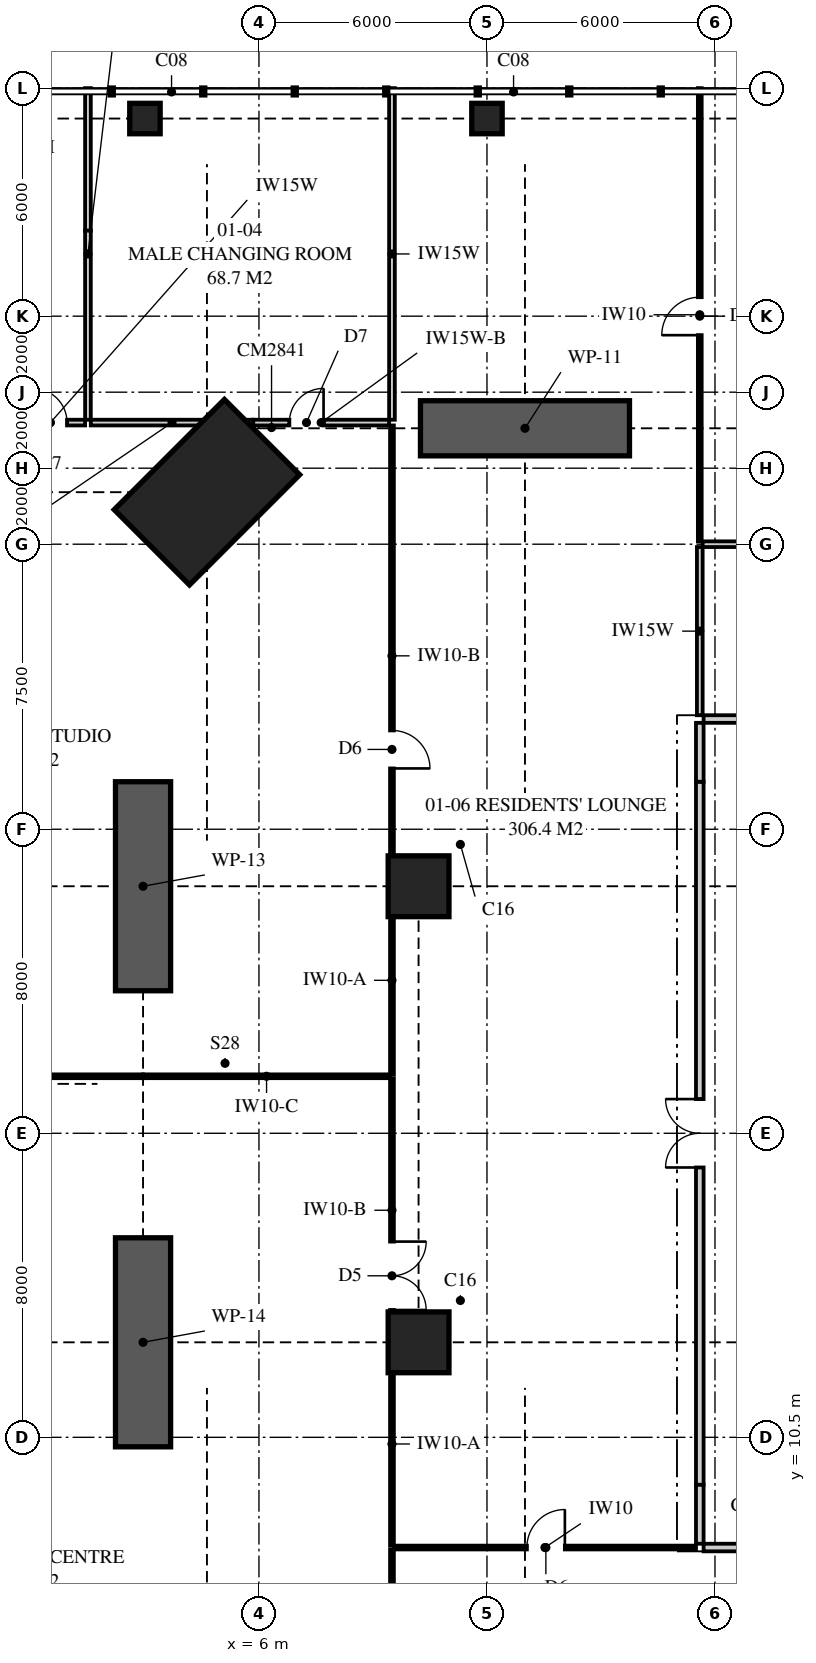
"""IFC4 building model, lengths in metres.
Left out: names, types, materials, properties, quantities, classifications, styles, units other than length and angle.
Written with IfcOpenShell. Run it as: python <this file> out.ifc"""

import sys

from ifc_helpers import new_model, si_unit, direction, frame, frame_2d, origin, origin_2d, place, context, subcontext, project, spatial, polyline, rectangle, outline, extrude, element, fill, save


model = new_model("IFC4")
c1 = context("Model", 3, precision=1e-05, world=origin(), true_north=direction((0.0, 1.0)))
c2 = subcontext(c1, "Body", "Model", "MODEL_VIEW")
j1 = project(units=[si_unit("LENGTHUNIT", "METRE"), si_unit("PLANEANGLEUNIT", "RADIAN")], contexts=[c1])
p1 = place(None, origin())
s1 = spatial("IfcSite", under=j1, at=p1, CompositionType="ELEMENT")
p2 = place(p1, origin())
s2 = spatial("IfcBuilding", under=s1, at=p2, CompositionType="ELEMENT")
p3 = place(p2, frame((0.0, 0.0, 6.0)))
s3 = spatial("IfcBuildingStorey", under=s2, at=p3, CompositionType="ELEMENT", Elevation=6.0)
p4 = place(p3, frame((4.631, 35.369, 0.0), z_axis=(0.0, 0.0, 1.0), x_axis=(0.707106781187, -0.707106781187, 0.0)))
e1 = element("IfcColumn", 1, at=p4, inside=s3, PredefinedType="COLUMN", context=c2, shape_type="SweptSolid", body=[
    extrude(rectangle(XDim=2.8, YDim=4.1, at=origin_2d()), origin(), (0.0, 0.0, 1.0), 5.0),
])
for number, where, z_axis, x_axis in (
    (2, (10.2, 13.0, 0.0), (0.0, 0.0, 1.0), (1.0, 0.0, 0.0)),
    (3, (10.2, 25.0, 0.0), (0.0, 0.0, 1.0), (1.0, 0.0, 0.0)),
):
    element("IfcColumn", number, at=place(p3, frame(where, z_axis=z_axis, x_axis=x_axis)), inside=s3, PredefinedType="COLUMN", context=c2, shape_type="SweptSolid", body=[
        extrude(rectangle(XDim=1.6, YDim=1.6, at=origin_2d()), origin(), (0.0, 0.0, 1.0), 5.0),
    ])
for number, where, z_axis, x_axis in (
    (4, (3.0, 45.2, 0.0), (0.0, 0.0, 1.0), (1.0, 0.0, 0.0)),
    (5, (12.0, 45.2, 0.0), (0.0, 0.0, 1.0), (1.0, 0.0, 0.0)),
):
    element("IfcColumn", number, at=place(p3, frame(where, z_axis=z_axis, x_axis=x_axis)), inside=s3, PredefinedType="COLUMN", context=c2, shape_type="SweptSolid", body=[
        extrude(rectangle(XDim=0.8, YDim=0.8, at=origin_2d()), origin(), (0.0, 0.0, 1.0), 5.0),
    ])
p5 = place(p3, frame((-9.2, 20.0, 0.0), z_axis=(0.0, 0.0, 1.0), x_axis=(1.0, 0.0, 0.0)))
e6 = element("IfcWall", 6, at=p5, inside=s3, PredefinedType="PARTITIONING", context=c2, shape_type="SweptSolid", body=[
    extrude(rectangle(XDim=12.15, YDim=0.1, at=frame_2d((6.075, 0.0))), origin(), (0.0, 0.0, 1.0), 4.12),
])
p6 = place(p3, frame((2.95, 20.0, 0.0), z_axis=(0.0, 0.0, 1.0), x_axis=(1.0, 0.0, 0.0)))
e7 = element("IfcWall", 7, at=p6, inside=s3, PredefinedType="PARTITIONING", context=c2, shape_type="SweptSolid", body=[
    extrude(outline(polyline([(0.0, 0.0), (6.5, 0.0), (6.5, 4.12), (5.99, 4.12), (5.99, 4.72), (1.26, 4.72), (1.26, 4.12), (0.0, 4.12), (0.0, 0.0)])), frame((0.0, 0.05, 0.0), z_axis=(0.0, -1.0, 0.0), x_axis=(1.0, 0.0, 0.0)), (0.0, 0.0, 1.0), 0.1),
])
p7 = place(p3, frame((9.5, 7.65, 0.0), z_axis=(0.0, 0.0, 1.0), x_axis=(0.0, 1.0, 0.0)))
e8 = element("IfcWall", 8, at=p7, inside=s3, PredefinedType="PARTITIONING", context=c2, shape_type="SweptSolid", body=[
    extrude(outline(polyline([(0.0, 0.0), (5.35, 0.0), (5.35, 4.12), (4.09, 4.12), (4.09, 4.72), (0.0, 4.72), (0.0, 0.0)])), frame((0.0, 0.05, 0.0), z_axis=(0.0, -1.0, 0.0), x_axis=(1.0, 0.0, 0.0)), (0.0, 0.0, 1.0), 0.1),
])
p8 = place(p3, frame((9.5, 13.0, 0.0), z_axis=(0.0, 0.0, 1.0), x_axis=(0.0, 1.0, 0.0)))
e9 = element("IfcWall", 9, at=p8, inside=s3, PredefinedType="PARTITIONING", context=c2, shape_type="SweptSolid", body=[
    extrude(rectangle(XDim=6.95, YDim=0.1, at=frame_2d((3.475, 0.0))), origin(), (0.0, 0.0, 1.0), 4.12),
])
p9 = place(p8, frame((0.85, 0.0, 0.0)))
e10 = element("IfcOpeningElement", 10, at=p9, cuts=e9, PredefinedType="OPENING", context=c2, shape_type="SweptSolid", body=[
    extrude(rectangle(XDim=1.8, YDim=2.1, at=frame_2d((0.9, 1.05))), frame((0.0, 0.06, 0.0), z_axis=(0.0, -1.0, 0.0), x_axis=(1.0, 0.0, 0.0)), (0.0, 0.0, 1.0), 0.12),
])
p10 = place(p3, frame((9.5, -6.0, 0.0), z_axis=(0.0, 0.0, 1.0), x_axis=(0.0, 1.0, 0.0)))
e11 = element("IfcWall", 11, at=p10, inside=s3, PredefinedType="PARTITIONING", context=c2, shape_type="SweptSolid", body=[
    extrude(outline(polyline([(0.0, 0.0), (13.55, 0.0), (13.55, 4.72), (8.21, 4.72), (8.21, 3.92), (5.69, 3.92), (5.69, 4.72), (2.06, 4.72), (2.06, 4.12), (0.0, 4.12), (0.0, 4.72), (0.0, 0.0)])), frame((0.0, 0.05, 0.0), z_axis=(0.0, -1.0, 0.0), x_axis=(1.0, 0.0, 0.0)), (0.0, 0.0, 1.0), 0.1),
])
p11 = place(p10, frame((5.4, 0.0, 0.0)))
e12 = element("IfcOpeningElement", 12, at=p11, cuts=e11, PredefinedType="OPENING", context=c2, shape_type="SweptSolid", body=[
    extrude(rectangle(XDim=1.0, YDim=2.1, at=frame_2d((0.5, 1.05))), frame((0.0, 0.06, 0.0), z_axis=(0.0, -1.0, 0.0), x_axis=(1.0, 0.0, 0.0)), (0.0, 0.0, 1.0), 0.12),
])
p12 = place(p3, frame((-0.4, 37.2, 0.0), z_axis=(0.0, 0.0, 1.0), x_axis=(1.0, 0.0, 0.0)))
e13 = element("IfcWall", 13, at=p12, inside=s3, PredefinedType="PLUMBINGWALL", context=c2, shape_type="SweptSolid", body=[
    extrude(rectangle(XDim=1.825, YDim=0.15, at=frame_2d((0.913, 0.0))), origin(), (0.0, 0.0, 1.0), 4.72),
])
p13 = place(p12, frame((0.45, 0.0, 0.0)))
e14 = element("IfcOpeningElement", 14, at=p13, cuts=e13, PredefinedType="OPENING", context=c2, shape_type="SweptSolid", body=[
    extrude(rectangle(XDim=0.9, YDim=2.1, at=frame_2d((0.45, 1.05))), frame((0.0, 0.085, 0.0), z_axis=(0.0, -1.0, 0.0), x_axis=(1.0, 0.0, 0.0)), (0.0, 0.0, 1.0), 0.17),
])
p14 = place(p3, frame((1.575, 37.2, 0.0), z_axis=(0.0, 0.0, 1.0), x_axis=(1.0, 0.0, 0.0)))
e15 = element("IfcWall", 15, at=p14, inside=s3, PredefinedType="PLUMBINGWALL", context=c2, shape_type="SweptSolid", body=[
    extrude(outline(polyline([(0.0, 0.0), (4.274, 0.0), (4.274, 4.12), (1.771, 4.12), (1.771, 4.72), (0.0, 4.72), (0.0, 0.0)])), frame((0.0, 0.075, 0.0), z_axis=(0.0, -1.0, 0.0), x_axis=(1.0, 0.0, 0.0)), (0.0, 0.0, 1.0), 0.15),
])
p15 = place(p3, frame((5.849, 37.2, 0.0), z_axis=(0.0, 0.0, 1.0), x_axis=(1.0, 0.0, 0.0)))
e16 = element("IfcWall", 16, at=p15, inside=s3, PredefinedType="PLUMBINGWALL", context=c2, shape_type="SweptSolid", body=[
    extrude(rectangle(XDim=3.576, YDim=0.15, at=frame_2d((1.788, 0.0))), origin(), (0.0, 0.0, 1.0), 3.92),
])
p16 = place(p15, frame((0.951, 0.0, 0.0)))
e17 = element("IfcOpeningElement", 17, at=p16, cuts=e16, PredefinedType="OPENING", context=c2, shape_type="SweptSolid", body=[
    extrude(rectangle(XDim=0.9, YDim=2.1, at=frame_2d((0.45, 1.05))), frame((0.0, 0.085, 0.0), z_axis=(0.0, -1.0, 0.0), x_axis=(1.0, 0.0, 0.0)), (0.0, 0.0, 1.0), 0.17),
])
p17 = place(p3, frame((9.5, 20.05, 0.0), z_axis=(0.0, 0.0, 1.0), x_axis=(0.0, 1.0, 0.0)))
e18 = element("IfcWall", 18, at=p17, inside=s3, PredefinedType="PARTITIONING", context=c2, shape_type="SweptSolid", body=[
    extrude(rectangle(XDim=4.95, YDim=0.1, at=frame_2d((2.475, 0.0))), origin(), (0.0, 0.0, 1.0), 4.12),
])
p18 = place(p3, frame((9.5, 25.0, 0.0), z_axis=(0.0, 0.0, 1.0), x_axis=(0.0, 1.0, 0.0)))
e19 = element("IfcWall", 19, at=p18, inside=s3, PredefinedType="PARTITIONING", context=c2, shape_type="SweptSolid", body=[
    extrude(outline(polyline([(0.0, 0.0), (12.125, 0.0), (12.125, 3.92), (10.79, 3.92), (10.79, 4.72), (1.26, 4.72), (1.26, 4.12), (0.0, 4.12), (0.0, 0.0)])), frame((0.0, 0.05, 0.0), z_axis=(0.0, -1.0, 0.0), x_axis=(1.0, 0.0, 0.0)), (0.0, 0.0, 1.0), 0.1),
])
p19 = place(p18, frame((3.1, 0.0, 0.0)))
e20 = element("IfcOpeningElement", 20, at=p19, cuts=e19, PredefinedType="OPENING", context=c2, shape_type="SweptSolid", body=[
    extrude(rectangle(XDim=1.0, YDim=2.1, at=frame_2d((0.5, 1.05))), frame((0.0, 0.06, 0.0), z_axis=(0.0, -1.0, 0.0), x_axis=(1.0, 0.0, 0.0)), (0.0, 0.0, 1.0), 0.12),
])
p20 = place(p3, frame((1.5, 37.275, 0.0), z_axis=(0.0, 0.0, 1.0), x_axis=(0.0, 1.0, 0.0)))
e21 = element("IfcWall", 21, at=p20, inside=s3, PredefinedType="PLUMBINGWALL", context=c2, shape_type="SweptSolid", body=[
    extrude(rectangle(XDim=4.975, YDim=0.15, at=frame_2d((2.488, 0.0))), origin(), (0.0, 0.0, 1.0), 4.72),
])
p21 = place(p3, frame((1.5, 42.25, 0.0), z_axis=(0.0, 0.0, 1.0), x_axis=(0.0, 1.0, 0.0)))
e22 = element("IfcWall", 22, at=p21, inside=s3, PredefinedType="PLUMBINGWALL", context=c2, shape_type="SweptSolid", body=[
    extrude(outline(polyline([(0.0, 0.0), (3.75, 0.0), (3.75, 4.72), (3.75, 4.12), (1.665, 4.12), (1.665, 4.72), (0.0, 4.72), (0.0, 0.0)])), frame((0.0, 0.075, 0.0), z_axis=(0.0, -1.0, 0.0), x_axis=(1.0, 0.0, 0.0)), (0.0, 0.0, 1.0), 0.15),
])
p22 = place(p3, frame((9.5, 37.275, 0.0), z_axis=(0.0, 0.0, 1.0), x_axis=(0.0, 1.0, 0.0)))
e23 = element("IfcWall", 23, at=p22, inside=s3, PredefinedType="PLUMBINGWALL", context=c2, shape_type="SweptSolid", body=[
    extrude(outline(polyline([(0.0, 0.0), (8.725, 0.0), (8.725, 4.72), (8.725, 4.12), (6.64, 4.12), (6.64, 4.72), (1.06, 4.72), (1.06, 3.92), (0.0, 3.92), (0.0, 4.72), (0.0, 0.0)])), frame((0.0, 0.075, 0.0), z_axis=(0.0, -1.0, 0.0), x_axis=(1.0, 0.0, 0.0)), (0.0, 0.0, 1.0), 0.15),
])
p23 = place(p3, frame((9.55, 7.6, 0.0), z_axis=(0.0, 0.0, 1.0), x_axis=(1.0, 0.0, 0.0)))
e24 = element("IfcWall", 24, at=p23, inside=s3, PredefinedType="PARTITIONING", context=c2, shape_type="SweptSolid", body=[
    extrude(outline(polyline([(0.0, 0.0), (7.95, 0.0), (7.95, 4.72), (4.71, 4.72), (4.71, 4.12), (2.19, 4.12), (2.19, 4.72), (0.0, 4.72), (0.0, 0.0)])), frame((0.0, 0.05, 0.0), z_axis=(0.0, -1.0, 0.0), x_axis=(1.0, 0.0, 0.0)), (0.0, 0.0, 1.0), 0.1),
])
p24 = place(p23, frame((3.5, 0.0, 0.0)))
e25 = element("IfcOpeningElement", 25, at=p24, cuts=e24, PredefinedType="OPENING", context=c2, shape_type="SweptSolid", body=[
    extrude(rectangle(XDim=1.0, YDim=2.1, at=frame_2d((0.5, 1.05))), frame((0.0, 0.06, 0.0), z_axis=(0.0, -1.0, 0.0), x_axis=(1.0, 0.0, 0.0)), (0.0, 0.0, 1.0), 0.12),
])
for number, where, z_axis, x_axis in (
    (26, (17.6, 7.7, 0.0), (0.0, 0.0, 1.0), (0.0, 1.0, 0.0)),
    (27, (17.6, 27.75, 0.0), (0.0, 0.0, 1.0), (0.0, 1.0, 0.0)),
):
    element("IfcWall", number, at=place(p3, frame(where, z_axis=z_axis, x_axis=x_axis)), inside=s3, PredefinedType="PARTITIONING", context=c2, shape_type="SweptSolid", body=[
        extrude(rectangle(XDim=1.55, YDim=0.2, at=frame_2d((0.775, 0.0))), origin(), (0.0, 0.0, 1.0), 4.72),
    ])
p25 = place(p3, frame((17.6, 9.25, 0.0), z_axis=(0.0, 0.0, 1.0), x_axis=(0.0, 1.0, 0.0)))
e28 = element("IfcWall", 28, at=p25, inside=s3, PredefinedType="PARTITIONING", context=c2, shape_type="SweptSolid", body=[
    extrude(outline(polyline([(0.0, 0.0), (18.5, 0.0), (18.5, 4.72), (17.06, 4.72), (17.06, 4.12), (14.44, 4.12), (14.44, 4.72), (5.06, 4.72), (5.06, 4.12), (2.44, 4.12), (2.44, 4.72), (0.0, 4.72), (0.0, 0.0)])), frame((0.0, 0.1, 0.0), z_axis=(0.0, -1.0, 0.0), x_axis=(1.0, 0.0, 0.0)), (0.0, 0.0, 1.0), 0.2),
])
p26 = place(p25, frame((8.35, 0.0, 0.0)))
e29 = element("IfcOpeningElement", 29, at=p26, cuts=e28, PredefinedType="OPENING", context=c2, shape_type="SweptSolid", body=[
    extrude(rectangle(XDim=1.8, YDim=2.1, at=frame_2d((0.9, 1.05))), frame((0.0, 0.11, 0.0), z_axis=(0.0, -1.0, 0.0), x_axis=(1.0, 0.0, 0.0)), (0.0, 0.0, 1.0), 0.22),
])
p27 = place(p3, frame((17.6, 29.5, 0.0), z_axis=(0.0, 0.0, 1.0), x_axis=(0.0, 1.0, 0.0)))
e30 = element("IfcWall", 30, at=p27, inside=s3, PredefinedType="PLUMBINGWALL", context=c2, shape_type="SweptSolid", body=[
    extrude(rectangle(XDim=4.425, YDim=0.15, at=frame_2d((2.212, 0.0))), origin(), (0.0, 0.0, 1.0), 4.72),
])
p28 = place(p3, frame((17.6, 34.075, 0.0), z_axis=(0.0, 0.0, 1.0), x_axis=(0.0, 1.0, 0.0)))
e31 = element("IfcWall", 31, at=p28, inside=s3, PredefinedType="PARTITIONING", context=c2, shape_type="SweptSolid", body=[
    extrude(outline(polyline([(0.0, 0.0), (11.925, 0.0), (11.925, 4.72), (11.925, 4.12), (9.865, 4.12), (9.865, 4.72), (4.235, 4.72), (4.235, 4.12), (1.715, 4.12), (1.715, 4.72), (0.0, 4.72), (0.0, 0.0)])), frame((0.0, 0.05, 0.0), z_axis=(0.0, -1.0, 0.0), x_axis=(1.0, 0.0, 0.0)), (0.0, 0.0, 1.0), 0.1),
])
p29 = place(p28, frame((5.425, 0.0, 0.0)))
e32 = element("IfcOpeningElement", 32, at=p29, cuts=e31, PredefinedType="OPENING", context=c2, shape_type="SweptSolid", body=[
    extrude(rectangle(XDim=1.0, YDim=2.1, at=frame_2d((0.5, 1.05))), frame((0.0, 0.06, 0.0), z_axis=(0.0, -1.0, 0.0), x_axis=(1.0, 0.0, 0.0)), (0.0, 0.0, 1.0), 0.12),
])
p30 = place(p3, frame((17.7, 7.6, 0.0), z_axis=(0.0, 0.0, 1.0), x_axis=(1.0, 0.0, 0.0)))
e33 = element("IfcWall", 33, at=p30, inside=s3, PredefinedType="PARTITIONING", context=c2, shape_type="SweptSolid", body=[
    extrude(outline(polyline([(0.0, 0.0), (12.25, 0.0), (12.25, 4.72), (12.25, 4.12), (9.99, 4.12), (9.99, 4.72), (7.61, 4.72), (7.61, 4.12), (4.99, 4.12), (4.99, 4.72), (4.11, 4.72), (4.11, 4.12), (1.49, 4.12), (1.49, 4.72), (0.0, 4.72), (0.0, 0.0)])), frame((0.0, 0.1, 0.0), z_axis=(0.0, -1.0, 0.0), x_axis=(1.0, 0.0, 0.0)), (0.0, 0.0, 1.0), 0.2),
])
p31 = place(p30, frame((5.6, 0.0, 0.0)))
e34 = element("IfcOpeningElement", 34, at=p31, cuts=e33, PredefinedType="OPENING", context=c2, shape_type="SweptSolid", body=[
    extrude(rectangle(XDim=1.0, YDim=2.1, at=frame_2d((0.5, 1.05))), frame((0.0, 0.11, 0.0), z_axis=(0.0, -1.0, 0.0), x_axis=(1.0, 0.0, 0.0)), (0.0, 0.0, 1.0), 0.22),
])
p32 = place(p3, frame((17.7, 29.4, 0.0), z_axis=(0.0, 0.0, 1.0), x_axis=(1.0, 0.0, 0.0)))
e35 = element("IfcWall", 35, at=p32, inside=s3, PredefinedType="PARTITIONING", context=c2, shape_type="SweptSolid", body=[
    extrude(rectangle(XDim=3.041, YDim=0.2, at=frame_2d((1.521, 0.0))), origin(), (0.0, 0.0, 1.0), 4.72),
])
p33 = place(p32, frame((1.008, 0.0, 0.0)))
e36 = element("IfcOpeningElement", 36, at=p33, cuts=e35, PredefinedType="OPENING", context=c2, shape_type="SweptSolid", body=[
    extrude(rectangle(XDim=1.0, YDim=2.1, at=frame_2d((0.5, 1.05))), frame((0.0, 0.11, 0.0), z_axis=(0.0, -1.0, 0.0), x_axis=(1.0, 0.0, 0.0)), (0.0, 0.0, 1.0), 0.22),
])
p34 = place(p3, frame((17.675, 34.0, 0.0), z_axis=(0.0, 0.0, 1.0), x_axis=(1.0, 0.0, 0.0)))
e37 = element("IfcWall", 37, at=p34, inside=s3, PredefinedType="PLUMBINGWALL", context=c2, shape_type="SweptSolid", body=[
    extrude(rectangle(XDim=3.066, YDim=0.15, at=frame_2d((1.533, 0.0))), origin(), (0.0, 0.0, 1.0), 4.72),
])
for number, where, z_axis, x_axis in (
    (38, (10.25, 37.05, 0.0), (0.0, 0.0, 1.0), (1.0, 0.0, 0.0)),
    (39, (2.95, 22.25, 0.0), (0.0, 0.0, 1.0), (0.0, 1.0, 0.0)),
    (40, (2.95, 10.25, 0.0), (0.0, 0.0, 1.0), (0.0, 1.0, 0.0)),
):
    element("IfcWall", number, at=place(p3, frame(where, z_axis=z_axis, x_axis=x_axis)), inside=s3, PredefinedType="SHEAR", context=c2, shape_type="SweptSolid", body=[
        extrude(rectangle(XDim=5.5, YDim=1.45, at=frame_2d((2.75, 0.0))), origin(), (0.0, 0.0, 1.0), 5.0),
    ])
p35 = place(p26, origin())
e41 = element("IfcDoor", 41, at=p35, inside=s3, OperationType="DOUBLE_DOOR_SINGLE_SWING", PredefinedType="DOOR", context=c2, shape_type="SweptSolid", body=[
    extrude(rectangle(XDim=1.8, YDim=2.1, at=frame_2d((0.9, 1.05))), frame((0.0, 0.025, 0.0), z_axis=(0.0, -1.0, 0.0), x_axis=(1.0, 0.0, 0.0)), (0.0, 0.0, 1.0), 0.05),
])
fill(e29, e41)
p36 = place(p9, frame((1.8, 0.0, 0.0), z_axis=(0.0, 0.0, 1.0), x_axis=(-1.0, 0.0, 0.0)))
e42 = element("IfcDoor", 42, at=p36, inside=s3, OperationType="DOUBLE_DOOR_SINGLE_SWING", PredefinedType="DOOR", context=c2, shape_type="SweptSolid", body=[
    extrude(rectangle(XDim=1.8, YDim=2.1, at=frame_2d((0.9, 1.05))), frame((0.0, 0.025, 0.0), z_axis=(0.0, -1.0, 0.0), x_axis=(1.0, 0.0, 0.0)), (0.0, 0.0, 1.0), 0.05),
])
fill(e10, e42)
p37 = place(p19, frame((1.0, 0.0, 0.0), z_axis=(0.0, 0.0, 1.0), x_axis=(-1.0, 0.0, 0.0)))
e43 = element("IfcDoor", 43, at=p37, inside=s3, OperationType="SINGLE_SWING_RIGHT", PredefinedType="DOOR", context=c2, shape_type="SweptSolid", body=[
    extrude(rectangle(XDim=1.0, YDim=2.1, at=frame_2d((0.5, 1.05))), frame((0.0, 0.025, 0.0), z_axis=(0.0, -1.0, 0.0), x_axis=(1.0, 0.0, 0.0)), (0.0, 0.0, 1.0), 0.05),
])
fill(e20, e43)
p38 = place(p13, origin())
e44 = element("IfcDoor", 44, at=p38, inside=s3, OperationType="SINGLE_SWING_LEFT", PredefinedType="DOOR", context=c2, shape_type="SweptSolid", body=[
    extrude(rectangle(XDim=0.9, YDim=2.1, at=frame_2d((0.45, 1.05))), frame((0.0, 0.025, 0.0), z_axis=(0.0, -1.0, 0.0), x_axis=(1.0, 0.0, 0.0)), (0.0, 0.0, 1.0), 0.05),
])
fill(e14, e44)
p39 = place(p16, origin())
e45 = element("IfcDoor", 45, at=p39, inside=s3, OperationType="SINGLE_SWING_RIGHT", PredefinedType="DOOR", context=c2, shape_type="SweptSolid", body=[
    extrude(rectangle(XDim=0.9, YDim=2.1, at=frame_2d((0.45, 1.05))), frame((0.0, 0.025, 0.0), z_axis=(0.0, -1.0, 0.0), x_axis=(1.0, 0.0, 0.0)), (0.0, 0.0, 1.0), 0.05),
])
fill(e17, e45)
p40 = place(p24, origin())
e46 = element("IfcDoor", 46, at=p40, inside=s3, OperationType="SINGLE_SWING_RIGHT", PredefinedType="DOOR", context=c2, shape_type="SweptSolid", body=[
    extrude(rectangle(XDim=1.0, YDim=2.1, at=frame_2d((0.5, 1.05))), frame((0.0, 0.025, 0.0), z_axis=(0.0, -1.0, 0.0), x_axis=(1.0, 0.0, 0.0)), (0.0, 0.0, 1.0), 0.05),
])
fill(e25, e46)
p41 = place(p29, origin())
e47 = element("IfcDoor", 47, at=p41, inside=s3, OperationType="SINGLE_SWING_LEFT", PredefinedType="DOOR", context=c2, shape_type="SweptSolid", body=[
    extrude(rectangle(XDim=1.0, YDim=2.1, at=frame_2d((0.5, 1.05))), frame((0.0, 0.025, 0.0), z_axis=(0.0, -1.0, 0.0), x_axis=(1.0, 0.0, 0.0)), (0.0, 0.0, 1.0), 0.05),
])
fill(e32, e47)
save(model, sys.argv[1])
